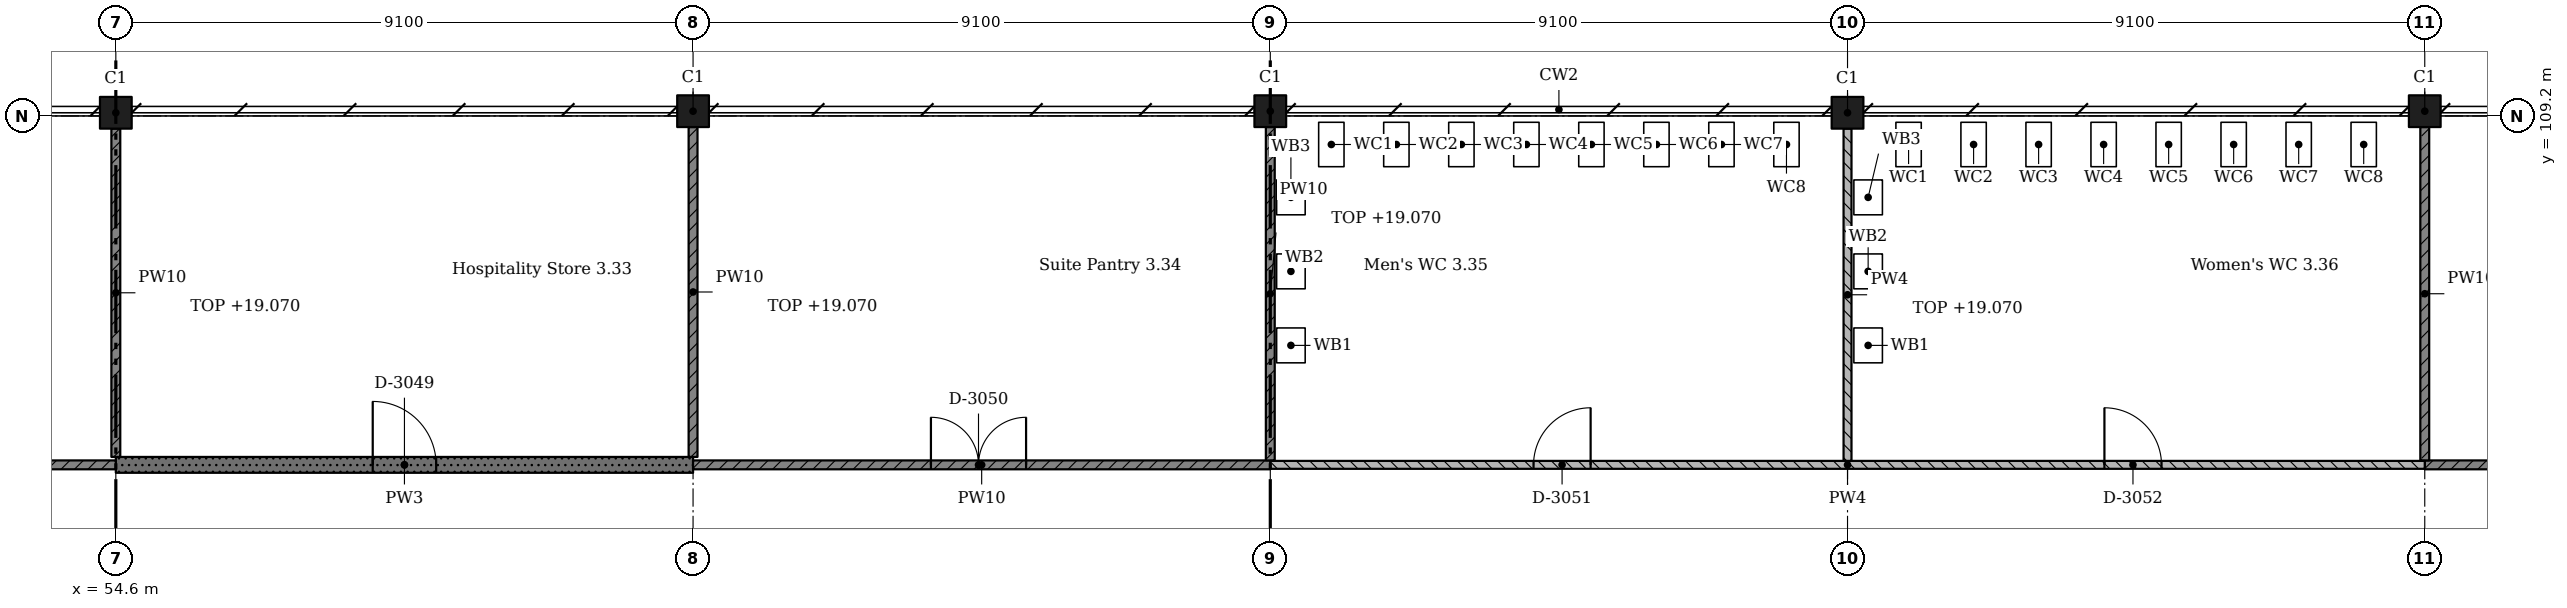
"""IFC4 building model, lengths in metres.
Left out: names, types, materials, properties, quantities, classifications, styles, units other than length and angle.
Written with IfcOpenShell. Run it as: python <this file> out.ifc"""

import sys

from ifc_helpers import new_model, si_unit, direction, frame, frame_2d, origin, origin_2d, place, context, subcontext, project, spatial, rectangle, extrude, element, fill, save


model = new_model("IFC4")
c1 = context("Model", 3, precision=1e-05, world=origin(), true_north=direction((0.0, 1.0)))
c2 = subcontext(c1, "Body", "Model", "MODEL_VIEW")
j1 = project(units=[si_unit("LENGTHUNIT", "METRE"), si_unit("PLANEANGLEUNIT", "RADIAN")], contexts=[c1])
p1 = place(None, origin())
s1 = spatial("IfcSite", under=j1, at=p1, CompositionType="ELEMENT")
p2 = place(p1, origin())
s2 = spatial("IfcBuilding", under=s1, at=p2, CompositionType="ELEMENT")
p3 = place(p2, frame((0.0, 0.0, 15.47)))
s3 = spatial("IfcBuildingStorey", under=s2, at=p3, CompositionType="ELEMENT", Elevation=15.47)
for number, where, z_axis, x_axis in (
    (1, (54.6, 109.25, 0.0), (0.0, 0.0, 1.0), (1.0, 0.0, 0.0)),
    (2, (63.7, 109.275, 0.0), (0.0, 0.0, 1.0), (1.0, 0.0, 0.0)),
    (3, (72.8, 109.275, 0.0), (0.0, 0.0, 1.0), (1.0, 0.0, 0.0)),
    (4, (81.9, 109.25, 0.0), (0.0, 0.0, 1.0), (1.0, 0.0, 0.0)),
    (5, (91.0, 109.275, 0.0), (0.0, 0.0, 1.0), (1.0, 0.0, 0.0)),
):
    element("IfcColumn", number, at=place(p3, frame(where, z_axis=z_axis, x_axis=x_axis)), inside=s3, PredefinedType="COLUMN", context=c2, shape_type="SweptSolid", body=[
        extrude(rectangle(XDim=0.5, YDim=0.5, at=origin_2d()), origin(), (0.0, 0.0, 1.0), 4.55),
    ])
p4 = place(p3, frame((45.5, 103.7, 0.0), z_axis=(0.0, 0.0, 1.0), x_axis=(1.0, 0.0, 0.0)))
e6 = element("IfcWall", 6, at=p4, inside=s3, PredefinedType="SOLIDWALL", context=c2, shape_type="SweptSolid", body=[
    extrude(rectangle(XDim=9.1, YDim=0.14, at=frame_2d((4.55, 0.0))), origin(), (0.0, 0.0, 1.0), 4.3),
])
p5 = place(p4, frame((3.75, 0.0, 0.0)))
e7 = element("IfcOpeningElement", 7, at=p5, cuts=e6, PredefinedType="OPENING", context=c2, shape_type="SweptSolid", body=[
    extrude(rectangle(XDim=1.5, YDim=2.1, at=frame_2d((0.75, 1.05))), frame((0.0, 0.08, 0.0), z_axis=(0.0, -1.0, 0.0), x_axis=(1.0, 0.0, 0.0)), (0.0, 0.0, 1.0), 0.16),
])
p6 = place(p3, frame((54.6, 103.7, 0.0), z_axis=(0.0, 0.0, 1.0), x_axis=(1.0, 0.0, 0.0)))
e8 = element("IfcWall", 8, at=p6, inside=s3, PredefinedType="SOLIDWALL", context=c2, shape_type="SweptSolid", body=[
    extrude(rectangle(XDim=9.1, YDim=0.25, at=frame_2d((4.55, 0.0))), origin(), (0.0, 0.0, 1.0), 4.3),
])
p7 = place(p6, frame((4.05, 0.0, 0.0)))
e9 = element("IfcOpeningElement", 9, at=p7, cuts=e8, PredefinedType="OPENING", context=c2, shape_type="SweptSolid", body=[
    extrude(rectangle(XDim=1.0, YDim=2.1, at=frame_2d((0.5, 1.05))), frame((0.0, 0.135, 0.0), z_axis=(0.0, -1.0, 0.0), x_axis=(1.0, 0.0, 0.0)), (0.0, 0.0, 1.0), 0.27),
])
p8 = place(p3, frame((54.6, 109.0, 0.0), z_axis=(0.0, 0.0, 1.0), x_axis=(0.0, -1.0, 0.0)))
e10 = element("IfcWall", 10, at=p8, inside=s3, PredefinedType="SOLIDWALL", context=c2, shape_type="SweptSolid", body=[
    extrude(rectangle(XDim=5.175, YDim=0.14, at=frame_2d((2.587, 0.0))), origin(), (0.0, 0.0, 1.0), 3.6),
])
p9 = place(p3, frame((63.7, 103.7, 0.0), z_axis=(0.0, 0.0, 1.0), x_axis=(1.0, 0.0, 0.0)))
e11 = element("IfcWall", 11, at=p9, inside=s3, PredefinedType="SOLIDWALL", context=c2, shape_type="SweptSolid", body=[
    extrude(rectangle(XDim=9.1, YDim=0.14, at=frame_2d((4.55, 0.0))), origin(), (0.0, 0.0, 1.0), 4.3),
])
p10 = place(p9, frame((3.75, 0.0, 0.0)))
e12 = element("IfcOpeningElement", 12, at=p10, cuts=e11, PredefinedType="OPENING", context=c2, shape_type="SweptSolid", body=[
    extrude(rectangle(XDim=1.5, YDim=2.1, at=frame_2d((0.75, 1.05))), frame((0.0, 0.08, 0.0), z_axis=(0.0, -1.0, 0.0), x_axis=(1.0, 0.0, 0.0)), (0.0, 0.0, 1.0), 0.16),
])
p11 = place(p3, frame((63.7, 109.025, 0.0), z_axis=(0.0, 0.0, 1.0), x_axis=(0.0, -1.0, 0.0)))
e13 = element("IfcWall", 13, at=p11, inside=s3, PredefinedType="SOLIDWALL", context=c2, shape_type="SweptSolid", body=[
    extrude(rectangle(XDim=5.2, YDim=0.14, at=frame_2d((2.6, 0.0))), origin(), (0.0, 0.0, 1.0), 3.6),
])
p12 = place(p3, frame((72.8, 103.7, 0.0), z_axis=(0.0, 0.0, 1.0), x_axis=(1.0, 0.0, 0.0)))
e14 = element("IfcWall", 14, at=p12, inside=s3, PredefinedType="PARTITIONING", context=c2, shape_type="SweptSolid", body=[
    extrude(rectangle(XDim=18.2, YDim=0.125, at=frame_2d((9.1, 0.0))), origin(), (0.0, 0.0, 1.0), 4.3),
])
p13 = place(p12, frame((4.15, 0.0, 0.0)))
e15 = element("IfcOpeningElement", 15, at=p13, cuts=e14, PredefinedType="OPENING", context=c2, shape_type="SweptSolid", body=[
    extrude(rectangle(XDim=0.9, YDim=2.1, at=frame_2d((0.45, 1.05))), frame((0.0, 0.073, 0.0), z_axis=(0.0, -1.0, 0.0), x_axis=(1.0, 0.0, 0.0)), (0.0, 0.0, 1.0), 0.145),
])
p14 = place(p12, frame((13.15, 0.0, 0.0)))
e16 = element("IfcOpeningElement", 16, at=p14, cuts=e14, PredefinedType="OPENING", context=c2, shape_type="SweptSolid", body=[
    extrude(rectangle(XDim=0.9, YDim=2.1, at=frame_2d((0.45, 1.05))), frame((0.0, 0.073, 0.0), z_axis=(0.0, -1.0, 0.0), x_axis=(1.0, 0.0, 0.0)), (0.0, 0.0, 1.0), 0.145),
])
p15 = place(p3, frame((72.8, 109.025, 0.0), z_axis=(0.0, 0.0, 1.0), x_axis=(0.0, -1.0, 0.0)))
e17 = element("IfcWall", 17, at=p15, inside=s3, PredefinedType="SOLIDWALL", context=c2, shape_type="SweptSolid", body=[
    extrude(rectangle(XDim=5.255, YDim=0.14, at=frame_2d((2.627, 0.0))), origin(), (0.0, 0.0, 1.0), 3.6),
])
p16 = place(p3, frame((81.9, 109.0, 0.0), z_axis=(0.0, 0.0, 1.0), x_axis=(0.0, -1.0, 0.0)))
e18 = element("IfcWall", 18, at=p16, inside=s3, PredefinedType="PARTITIONING", context=c2, shape_type="SweptSolid", body=[
    extrude(rectangle(XDim=5.238, YDim=0.125, at=frame_2d((2.619, 0.0))), origin(), (0.0, 0.0, 1.0), 3.6),
])
p17 = place(p3, frame((91.0, 103.7, 0.0), z_axis=(0.0, 0.0, 1.0), x_axis=(1.0, 0.0, 0.0)))
e19 = element("IfcWall", 19, at=p17, inside=s3, PredefinedType="SOLIDWALL", context=c2, shape_type="SweptSolid", body=[
    extrude(rectangle(XDim=9.1, YDim=0.14, at=frame_2d((4.55, 0.0))), origin(), (0.0, 0.0, 1.0), 4.3),
])
p18 = place(p17, frame((3.75, 0.0, 0.0)))
e20 = element("IfcOpeningElement", 20, at=p18, cuts=e19, PredefinedType="OPENING", context=c2, shape_type="SweptSolid", body=[
    extrude(rectangle(XDim=1.5, YDim=2.1, at=frame_2d((0.75, 1.05))), frame((0.0, 0.08, 0.0), z_axis=(0.0, -1.0, 0.0), x_axis=(1.0, 0.0, 0.0)), (0.0, 0.0, 1.0), 0.16),
])
p19 = place(p3, frame((91.0, 109.025, 0.0), z_axis=(0.0, 0.0, 1.0), x_axis=(0.0, -1.0, 0.0)))
e21 = element("IfcWall", 21, at=p19, inside=s3, PredefinedType="SOLIDWALL", context=c2, shape_type="SweptSolid", body=[
    extrude(rectangle(XDim=5.255, YDim=0.14, at=frame_2d((2.627, 0.0))), origin(), (0.0, 0.0, 1.0), 3.6),
])
p20 = place(p7, origin())
e22 = element("IfcDoor", 22, at=p20, inside=s3, OperationType="SINGLE_SWING_RIGHT", PredefinedType="DOOR", context=c2, shape_type="SweptSolid", body=[
    extrude(rectangle(XDim=1.0, YDim=2.1, at=frame_2d((0.5, 1.05))), frame((0.0, 0.025, 0.0), z_axis=(0.0, -1.0, 0.0), x_axis=(1.0, 0.0, 0.0)), (0.0, 0.0, 1.0), 0.05),
])
fill(e9, e22)
p21 = place(p10, origin())
e23 = element("IfcDoor", 23, at=p21, inside=s3, OperationType="DOUBLE_DOOR_SINGLE_SWING", PredefinedType="DOOR", context=c2, shape_type="SweptSolid", body=[
    extrude(rectangle(XDim=1.5, YDim=2.1, at=frame_2d((0.75, 1.05))), frame((0.0, 0.025, 0.0), z_axis=(0.0, -1.0, 0.0), x_axis=(1.0, 0.0, 0.0)), (0.0, 0.0, 1.0), 0.05),
])
fill(e12, e23)
p22 = place(p13, origin())
e24 = element("IfcDoor", 24, at=p22, inside=s3, OperationType="SINGLE_SWING_LEFT", PredefinedType="DOOR", context=c2, shape_type="SweptSolid", body=[
    extrude(rectangle(XDim=0.9, YDim=2.1, at=frame_2d((0.45, 1.05))), frame((0.0, 0.025, 0.0), z_axis=(0.0, -1.0, 0.0), x_axis=(1.0, 0.0, 0.0)), (0.0, 0.0, 1.0), 0.05),
])
fill(e15, e24)
p23 = place(p14, origin())
e25 = element("IfcDoor", 25, at=p23, inside=s3, OperationType="SINGLE_SWING_RIGHT", PredefinedType="DOOR", context=c2, shape_type="SweptSolid", body=[
    extrude(rectangle(XDim=0.9, YDim=2.1, at=frame_2d((0.45, 1.05))), frame((0.0, 0.025, 0.0), z_axis=(0.0, -1.0, 0.0), x_axis=(1.0, 0.0, 0.0)), (0.0, 0.0, 1.0), 0.05),
])
fill(e16, e25)
save(model, sys.argv[1])
